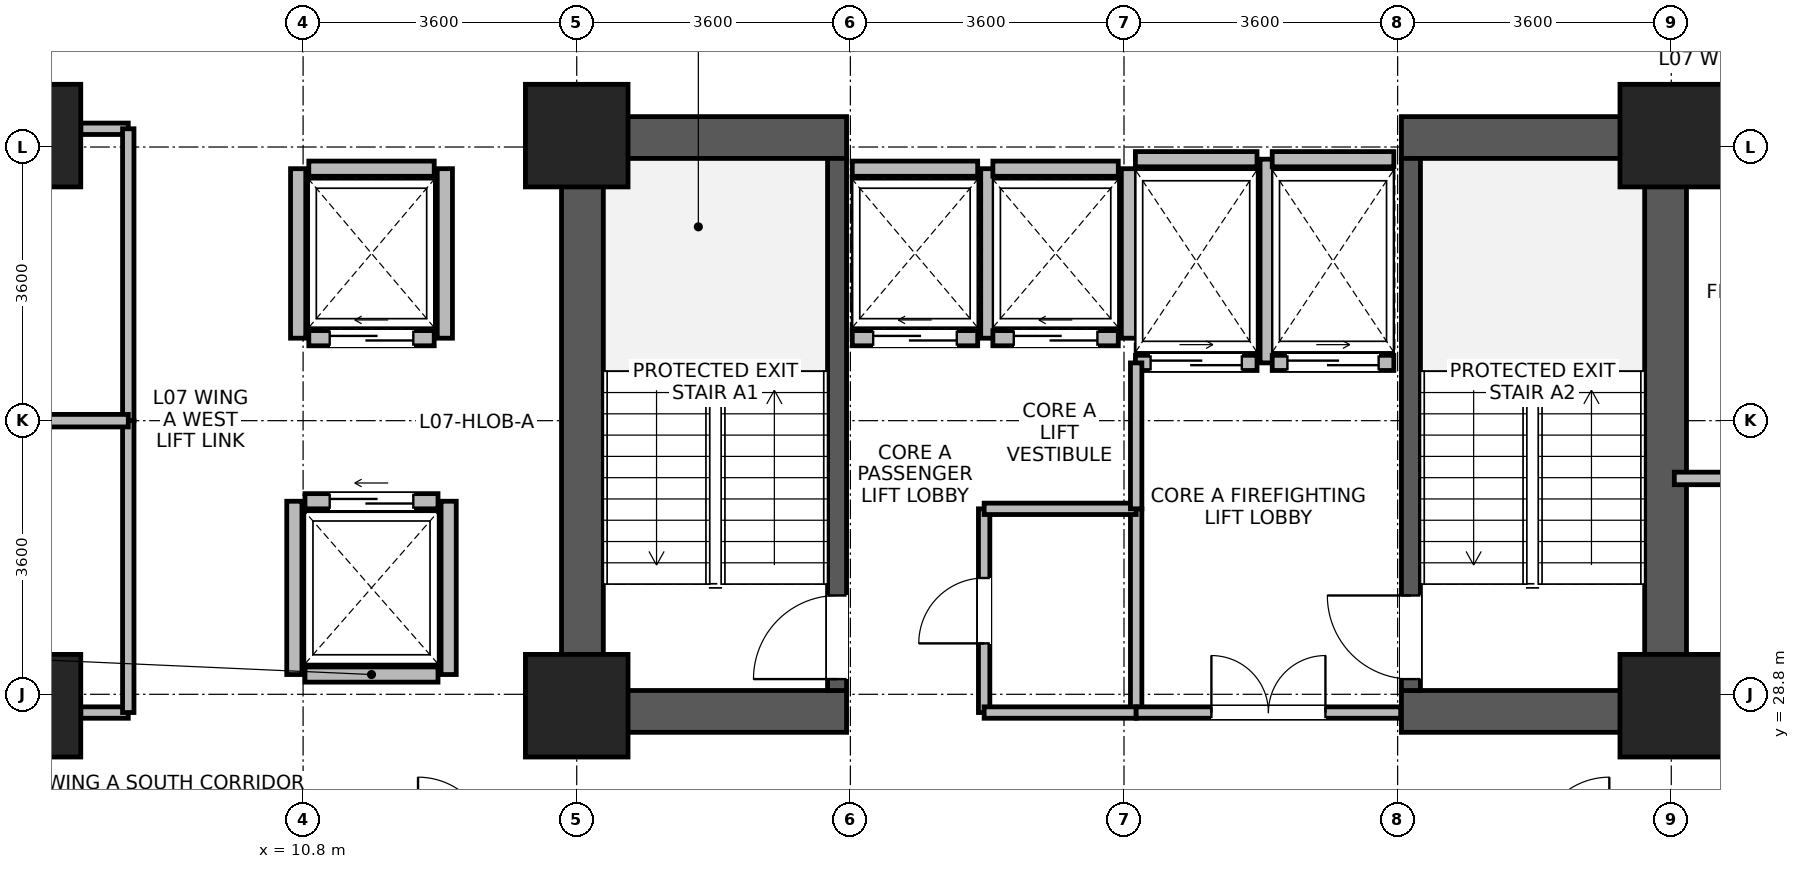
"""IFC4 building model, lengths in metres.
Left out: names, types, materials, properties, quantities, classifications, styles, units other than length and angle.
Written with IfcOpenShell. Run it as: python <this file> out.ifc"""

import sys

from ifc_helpers import new_model, si_unit, direction, frame, frame_2d, origin, origin_2d, place, context, subcontext, project, spatial, rectangle, extrude, source, transform, mapped, element, fill, save


model = new_model("IFC4")
c1 = context("Model", 3, precision=1e-05, world=origin(), true_north=direction((0.0, 1.0)))
c2 = subcontext(c1, "Body", "Model", "MODEL_VIEW")
j1 = project(units=[si_unit("LENGTHUNIT", "METRE"), si_unit("PLANEANGLEUNIT", "RADIAN")], contexts=[c1])
p1 = place(None, origin())
s1 = spatial("IfcSite", under=j1, at=p1, CompositionType="ELEMENT")
p2 = place(p1, origin())
s2 = spatial("IfcBuilding", under=s1, at=p2, CompositionType="ELEMENT")
p3 = place(p2, frame((0.0, 0.0, 32.7)))
s3 = spatial("IfcBuildingStorey", under=s2, at=p3, CompositionType="ELEMENT", Elevation=32.7)
for number, where, z_axis, x_axis in (
    (1, (14.475, 28.3, 0.0), (0.0, 0.0, 1.0), (0.0, 1.0, 0.0)),
    (2, (28.725, 28.3, 0.0), (0.0, 0.0, 1.0), (0.0, 1.0, 0.0)),
):
    element("IfcWall", number, at=place(p3, frame(where, z_axis=z_axis, x_axis=x_axis)), inside=s3, PredefinedType="SHEAR", context=c2, shape_type="SweptSolid", body=[
        extrude(rectangle(XDim=8.1, YDim=0.55, at=frame_2d((4.05, 0.0))), origin(), (0.0, 0.0, 1.0), 3.45),
    ])
for number, where, z_axis, x_axis in (
    (3, (14.75, 28.575, 0.0), (0.0, 0.0, 1.0), (1.0, 0.0, 0.0)),
    (4, (25.25, 28.575, 0.0), (0.0, 0.0, 1.0), (1.0, 0.0, 0.0)),
    (5, (14.75, 36.125, 0.0), (0.0, 0.0, 1.0), (1.0, 0.0, 0.0)),
    (6, (25.25, 36.125, 0.0), (0.0, 0.0, 1.0), (1.0, 0.0, 0.0)),
):
    element("IfcWall", number, at=place(p3, frame(where, z_axis=z_axis, x_axis=x_axis)), inside=s3, PredefinedType="SHEAR", context=c2, shape_type="SweptSolid", body=[
        extrude(rectangle(XDim=3.2, YDim=0.55, at=frame_2d((1.6, 0.0))), origin(), (0.0, 0.0, 1.0), 3.45),
    ])
p4 = place(p3, frame((17.825, 28.85, 0.0), z_axis=(0.0, 0.0, 1.0), x_axis=(0.0, 1.0, 0.0)))
e7 = element("IfcWall", 7, at=p4, inside=s3, PredefinedType="SHEAR", context=c2, shape_type="SweptSolid", body=[
    extrude(rectangle(XDim=7.0, YDim=0.25, at=frame_2d((3.5, 0.0))), origin(), (0.0, 0.0, 1.0), 3.45),
])
p5 = place(p4, frame((0.15, 0.0, 0.0)))
e8 = element("IfcOpeningElement", 8, at=p5, cuts=e7, PredefinedType="OPENING", context=c2, shape_type="SweptSolid", body=[
    extrude(rectangle(XDim=1.1, YDim=2.08, at=frame_2d((0.55, 1.04))), frame((0.0, 0.135, 0.0), z_axis=(0.0, -1.0, 0.0), x_axis=(1.0, 0.0, 0.0)), (0.0, 0.0, 1.0), 0.27),
])
p6 = place(p3, frame((25.375, 28.85, 0.0), z_axis=(0.0, 0.0, 1.0), x_axis=(0.0, 1.0, 0.0)))
e9 = element("IfcWall", 9, at=p6, inside=s3, PredefinedType="SHEAR", context=c2, shape_type="SweptSolid", body=[
    extrude(rectangle(XDim=7.0, YDim=0.25, at=frame_2d((3.5, 0.0))), origin(), (0.0, 0.0, 1.0), 3.45),
])
p7 = place(p6, frame((0.15, 0.0, 0.0)))
e10 = element("IfcOpeningElement", 10, at=p7, cuts=e9, PredefinedType="OPENING", context=c2, shape_type="SweptSolid", body=[
    extrude(rectangle(XDim=1.1, YDim=2.08, at=frame_2d((0.55, 1.04))), frame((0.0, 0.135, 0.0), z_axis=(0.0, -1.0, 0.0), x_axis=(1.0, 0.0, 0.0)), (0.0, 0.0, 1.0), 0.27),
])
m1 = source(origin(), c2, "Body", "SweptSolid", [
    extrude(rectangle(XDim=1.35, YDim=1.35, at=origin_2d()), origin(), (0.0, 0.0, 1.0), 3.7),
])
for number, where, z_axis, x_axis in (
    (11, (7.2, 28.65, 0.0), (0.0, 0.0, 1.0), (1.0, 0.0, 0.0)),
    (12, (7.2, 36.15, 0.0), (0.0, 0.0, 1.0), (1.0, 0.0, 0.0)),
    (13, (14.4, 28.65, 0.0), (0.0, 0.0, 1.0), (1.0, 0.0, 0.0)),
    (14, (14.4, 36.15, 0.0), (0.0, 0.0, 1.0), (1.0, 0.0, 0.0)),
    (15, (28.8, 28.65, 0.0), (0.0, 0.0, 1.0), (1.0, 0.0, 0.0)),
    (16, (28.8, 36.15, 0.0), (0.0, 0.0, 1.0), (1.0, 0.0, 0.0)),
):
    element("IfcColumn", number, at=place(p3, frame(where, z_axis=z_axis, x_axis=x_axis)), inside=s3, PredefinedType="COLUMN", context=c2, shape_type="MappedRepresentation", body=[
        mapped(m1, transform((0.0, 0.0, 0.0), x_axis=(1.0, 0.0, 0.0), y_axis=(0.0, 1.0, 0.0), z_axis=(0.0, 0.0, 1.0), scale=1.0)),
    ])
p8 = place(p3, frame((18.025, 33.485, 0.0), z_axis=(0.0, 0.0, 1.0), x_axis=(1.0, 0.0, 0.0)))
e17 = element("IfcWall", 17, at=p8, inside=s3, PredefinedType="PARTITIONING", context=c2, shape_type="SweptSolid", body=[
    extrude(rectangle(XDim=1.65, YDim=0.2, at=frame_2d((0.825, 0.0))), origin(), (0.0, 0.0, 1.0), 3.43),
])
p9 = place(p8, frame((0.275, 0.0, 0.0)))
e18 = element("IfcOpeningElement", 18, at=p9, cuts=e17, PredefinedType="OPENING", context=c2, shape_type="SweptSolid", body=[
    extrude(rectangle(XDim=1.1, YDim=2.12, at=frame_2d((0.55, 1.06))), frame((0.0, 0.11, 0.0), z_axis=(0.0, -1.0, 0.0), x_axis=(1.0, 0.0, 0.0)), (0.0, 0.0, 1.0), 0.22),
])
p10 = place(p3, frame((18.025, 35.715, 0.0), z_axis=(0.0, 0.0, 1.0), x_axis=(1.0, 0.0, 0.0)))
e19 = element("IfcWall", 19, at=p10, inside=s3, PredefinedType="PARTITIONING", context=c2, shape_type="SweptSolid", body=[
    extrude(rectangle(XDim=1.65, YDim=0.2, at=frame_2d((0.825, 0.0))), origin(), (0.0, 0.0, 1.0), 2.23),
])
p11 = place(p3, frame((19.815, 33.485, 0.0), z_axis=(0.0, 0.0, 1.0), x_axis=(0.0, 1.0, 0.0)))
e20 = element("IfcWall", 20, at=p11, inside=s3, PredefinedType="PARTITIONING", context=c2, shape_type="SweptSolid", body=[
    extrude(rectangle(XDim=2.23, YDim=0.2, at=frame_2d((1.115, 0.0))), origin(), (0.0, 0.0, 1.0), 3.43),
])
p12 = place(p3, frame((19.875, 33.485, 0.0), z_axis=(0.0, 0.0, 1.0), x_axis=(1.0, 0.0, 0.0)))
e21 = element("IfcWall", 21, at=p12, inside=s3, PredefinedType="PARTITIONING", context=c2, shape_type="SweptSolid", body=[
    extrude(rectangle(XDim=1.65, YDim=0.2, at=frame_2d((0.825, 0.0))), origin(), (0.0, 0.0, 1.0), 3.43),
])
p13 = place(p12, frame((0.275, 0.0, 0.0)))
e22 = element("IfcOpeningElement", 22, at=p13, cuts=e21, PredefinedType="OPENING", context=c2, shape_type="SweptSolid", body=[
    extrude(rectangle(XDim=1.1, YDim=2.12, at=frame_2d((0.55, 1.06))), frame((0.0, 0.11, 0.0), z_axis=(0.0, -1.0, 0.0), x_axis=(1.0, 0.0, 0.0)), (0.0, 0.0, 1.0), 0.22),
])
p14 = place(p3, frame((19.875, 35.715, 0.0), z_axis=(0.0, 0.0, 1.0), x_axis=(1.0, 0.0, 0.0)))
e23 = element("IfcWall", 23, at=p14, inside=s3, PredefinedType="PARTITIONING", context=c2, shape_type="SweptSolid", body=[
    extrude(rectangle(XDim=1.65, YDim=0.2, at=frame_2d((0.825, 0.0))), origin(), (0.0, 0.0, 1.0), 2.23),
])
p15 = place(p3, frame((21.665, 33.485, 0.0), z_axis=(0.0, 0.0, 1.0), x_axis=(0.0, 1.0, 0.0)))
e24 = element("IfcWall", 24, at=p15, inside=s3, PredefinedType="PARTITIONING", context=c2, shape_type="SweptSolid", body=[
    extrude(rectangle(XDim=2.23, YDim=0.2, at=frame_2d((1.115, 0.0))), origin(), (0.0, 0.0, 1.0), 3.43),
])
p16 = place(p3, frame((10.825, 29.06, 0.0), z_axis=(0.0, 0.0, 1.0), x_axis=(1.0, 0.0, 0.0)))
e25 = element("IfcWall", 25, at=p16, inside=s3, PredefinedType="PARTITIONING", context=c2, shape_type="SweptSolid", body=[
    extrude(rectangle(XDim=1.75, YDim=0.2, at=frame_2d((0.875, 0.0))), origin(), (0.0, 0.0, 1.0), 3.43),
])
p17 = place(p3, frame((10.825, 31.34, 0.0), z_axis=(0.0, 0.0, 1.0), x_axis=(1.0, 0.0, 0.0)))
e26 = element("IfcWall", 26, at=p17, inside=s3, PredefinedType="PARTITIONING", context=c2, shape_type="SweptSolid", body=[
    extrude(rectangle(XDim=1.75, YDim=0.2, at=frame_2d((0.875, 0.0))), origin(), (0.0, 0.0, 1.0), 3.43),
])
p18 = place(p17, frame((0.325, 0.0, 0.0)))
e27 = element("IfcOpeningElement", 27, at=p18, cuts=e26, PredefinedType="OPENING", context=c2, shape_type="SweptSolid", body=[
    extrude(rectangle(XDim=1.1, YDim=2.12, at=frame_2d((0.55, 1.06))), frame((0.0, 0.11, 0.0), z_axis=(0.0, -1.0, 0.0), x_axis=(1.0, 0.0, 0.0)), (0.0, 0.0, 1.0), 0.22),
])
for number, where, z_axis, x_axis in (
    (28, (10.685, 29.06, 0.0), (0.0, 0.0, 1.0), (0.0, 1.0, 0.0)),
    (29, (12.715, 29.06, 0.0), (0.0, 0.0, 1.0), (0.0, 1.0, 0.0)),
):
    element("IfcWall", number, at=place(p3, frame(where, z_axis=z_axis, x_axis=x_axis)), inside=s3, PredefinedType="PARTITIONING", context=c2, shape_type="SweptSolid", body=[
        extrude(rectangle(XDim=2.28, YDim=0.2, at=frame_2d((1.14, 0.0))), origin(), (0.0, 0.0, 1.0), 3.43),
    ])
p19 = place(p3, frame((10.875, 33.485, 0.0), z_axis=(0.0, 0.0, 1.0), x_axis=(1.0, 0.0, 0.0)))
e30 = element("IfcWall", 30, at=p19, inside=s3, PredefinedType="PARTITIONING", context=c2, shape_type="SweptSolid", body=[
    extrude(rectangle(XDim=1.65, YDim=0.2, at=frame_2d((0.825, 0.0))), origin(), (0.0, 0.0, 1.0), 3.43),
])
p20 = place(p19, frame((0.275, 0.0, 0.0)))
e31 = element("IfcOpeningElement", 31, at=p20, cuts=e30, PredefinedType="OPENING", context=c2, shape_type="SweptSolid", body=[
    extrude(rectangle(XDim=1.1, YDim=2.12, at=frame_2d((0.55, 1.06))), frame((0.0, 0.11, 0.0), z_axis=(0.0, -1.0, 0.0), x_axis=(1.0, 0.0, 0.0)), (0.0, 0.0, 1.0), 0.22),
])
p21 = place(p3, frame((10.875, 35.715, 0.0), z_axis=(0.0, 0.0, 1.0), x_axis=(1.0, 0.0, 0.0)))
e32 = element("IfcWall", 32, at=p21, inside=s3, PredefinedType="PARTITIONING", context=c2, shape_type="SweptSolid", body=[
    extrude(rectangle(XDim=1.65, YDim=0.2, at=frame_2d((0.825, 0.0))), origin(), (0.0, 0.0, 1.0), 3.43),
])
for number, where, z_axis, x_axis in (
    (33, (10.735, 33.485, 0.0), (0.0, 0.0, 1.0), (0.0, 1.0, 0.0)),
    (34, (12.665, 33.485, 0.0), (0.0, 0.0, 1.0), (0.0, 1.0, 0.0)),
):
    element("IfcWall", number, at=place(p3, frame(where, z_axis=z_axis, x_axis=x_axis)), inside=s3, PredefinedType="PARTITIONING", context=c2, shape_type="SweptSolid", body=[
        extrude(rectangle(XDim=2.23, YDim=0.2, at=frame_2d((1.115, 0.0))), origin(), (0.0, 0.0, 1.0), 3.43),
    ])
p22 = place(p3, frame((21.75, 33.16, 0.0), z_axis=(0.0, 0.0, 1.0), x_axis=(1.0, 0.0, 0.0)))
e35 = element("IfcWall", 35, at=p22, inside=s3, PredefinedType="PARTITIONING", context=c2, shape_type="SweptSolid", body=[
    extrude(rectangle(XDim=1.6, YDim=0.2, at=frame_2d((0.8, 0.0))), origin(), (0.0, 0.0, 1.0), 3.43),
])
p23 = place(p22, frame((0.2, 0.0, 0.0)))
e36 = element("IfcOpeningElement", 36, at=p23, cuts=e35, PredefinedType="OPENING", context=c2, shape_type="SweptSolid", body=[
    extrude(rectangle(XDim=1.2, YDim=2.12, at=frame_2d((0.6, 1.06))), frame((0.0, 0.11, 0.0), z_axis=(0.0, -1.0, 0.0), x_axis=(1.0, 0.0, 0.0)), (0.0, 0.0, 1.0), 0.22),
])
p24 = place(p3, frame((21.75, 35.84, 0.0), z_axis=(0.0, 0.0, 1.0), x_axis=(1.0, 0.0, 0.0)))
e37 = element("IfcWall", 37, at=p24, inside=s3, PredefinedType="PARTITIONING", context=c2, shape_type="SweptSolid", body=[
    extrude(rectangle(XDim=1.6, YDim=0.2, at=frame_2d((0.8, 0.0))), origin(), (0.0, 0.0, 1.0), 2.23),
])
p25 = place(p3, frame((23.49, 33.16, 0.0), z_axis=(0.0, 0.0, 1.0), x_axis=(0.0, 1.0, 0.0)))
e38 = element("IfcWall", 38, at=p25, inside=s3, PredefinedType="PARTITIONING", context=c2, shape_type="SweptSolid", body=[
    extrude(rectangle(XDim=2.68, YDim=0.2, at=frame_2d((1.34, 0.0))), origin(), (0.0, 0.0, 1.0), 3.43),
])
p26 = place(p3, frame((23.55, 33.16, 0.0), z_axis=(0.0, 0.0, 1.0), x_axis=(1.0, 0.0, 0.0)))
e39 = element("IfcWall", 39, at=p26, inside=s3, PredefinedType="PARTITIONING", context=c2, shape_type="SweptSolid", body=[
    extrude(rectangle(XDim=1.6, YDim=0.2, at=frame_2d((0.8, 0.0))), origin(), (0.0, 0.0, 1.0), 3.43),
])
p27 = place(p26, frame((0.2, 0.0, 0.0)))
e40 = element("IfcOpeningElement", 40, at=p27, cuts=e39, PredefinedType="OPENING", context=c2, shape_type="SweptSolid", body=[
    extrude(rectangle(XDim=1.2, YDim=2.12, at=frame_2d((0.6, 1.06))), frame((0.0, 0.11, 0.0), z_axis=(0.0, -1.0, 0.0), x_axis=(1.0, 0.0, 0.0)), (0.0, 0.0, 1.0), 0.22),
])
p28 = place(p3, frame((23.55, 35.84, 0.0), z_axis=(0.0, 0.0, 1.0), x_axis=(1.0, 0.0, 0.0)))
e41 = element("IfcWall", 41, at=p28, inside=s3, PredefinedType="PARTITIONING", context=c2, shape_type="SweptSolid", body=[
    extrude(rectangle(XDim=1.6, YDim=0.2, at=frame_2d((0.8, 0.0))), origin(), (0.0, 0.0, 1.0), 2.23),
])
for number, where, z_axis, x_axis in (
    (42, (7.875, 28.56, 0.0), (0.0, 0.0, 1.0), (1.0, 0.0, 0.0)),
    (43, (7.875, 36.24, 0.0), (0.0, 0.0, 1.0), (1.0, 0.0, 0.0)),
):
    element("IfcWall", number, at=place(p3, frame(where, z_axis=z_axis, x_axis=x_axis)), inside=s3, PredefinedType="PARTITIONING", context=c2, shape_type="SweptSolid", body=[
        extrude(rectangle(XDim=0.625, YDim=0.15, at=frame_2d((0.312, 0.0))), origin(), (0.0, 0.0, 1.0), 2.78),
    ])
p29 = place(p3, frame((8.5, 32.4, 0.0), z_axis=(0.0, 0.0, 1.0), x_axis=(0.0, 1.0, 0.0)))
e44 = element("IfcWall", 44, at=p29, inside=s3, PredefinedType="PARTITIONING", context=c2, shape_type="SweptSolid", body=[
    extrude(rectangle(XDim=3.84, YDim=0.15, at=frame_2d((1.92, 0.0))), origin(), (0.0, 0.0, 1.0), 3.43),
])
p30 = place(p3, frame((8.5, 28.56, 0.0), z_axis=(0.0, 0.0, 1.0), x_axis=(0.0, 1.0, 0.0)))
e45 = element("IfcWall", 45, at=p30, inside=s3, PredefinedType="PARTITIONING", context=c2, shape_type="SweptSolid", body=[
    extrude(rectangle(XDim=3.84, YDim=0.15, at=frame_2d((1.92, 0.0))), origin(), (0.0, 0.0, 1.0), 3.43),
])
p31 = place(p3, frame((19.76, 28.56, 0.0), z_axis=(0.0, 0.0, 1.0), x_axis=(0.0, 1.0, 0.0)))
e46 = element("IfcWall", 46, at=p31, inside=s3, PredefinedType="PARTITIONING", context=c2, shape_type="SweptSolid", body=[
    extrude(rectangle(XDim=2.68, YDim=0.15, at=frame_2d((1.34, 0.0))), origin(), (0.0, 0.0, 1.0), 3.43),
])
p32 = place(p31, frame((0.91, 0.0, 0.0)))
e47 = element("IfcOpeningElement", 47, at=p32, cuts=e46, PredefinedType="OPENING", context=c2, shape_type="SweptSolid", body=[
    extrude(rectangle(XDim=0.86, YDim=2.02, at=frame_2d((0.43, 1.01))), frame((0.0, 0.085, 0.0), z_axis=(0.0, -1.0, 0.0), x_axis=(1.0, 0.0, 0.0)), (0.0, 0.0, 1.0), 0.17),
])
p33 = place(p3, frame((21.76, 28.56, 0.0), z_axis=(0.0, 0.0, 1.0), x_axis=(0.0, 1.0, 0.0)))
e48 = element("IfcWall", 48, at=p33, inside=s3, PredefinedType="PARTITIONING", context=c2, shape_type="SweptSolid", body=[
    extrude(rectangle(XDim=2.68, YDim=0.15, at=frame_2d((1.34, 0.0))), origin(), (0.0, 0.0, 1.0), 3.43),
])
p34 = place(p3, frame((19.76, 28.56, 0.0), z_axis=(0.0, 0.0, 1.0), x_axis=(1.0, 0.0, 0.0)))
e49 = element("IfcWall", 49, at=p34, inside=s3, PredefinedType="PARTITIONING", context=c2, shape_type="SweptSolid", body=[
    extrude(rectangle(XDim=2.0, YDim=0.15, at=frame_2d((1.0, 0.0))), origin(), (0.0, 0.0, 1.0), 2.23),
])
p35 = place(p3, frame((19.76, 31.24, 0.0), z_axis=(0.0, 0.0, 1.0), x_axis=(1.0, 0.0, 0.0)))
e50 = element("IfcWall", 50, at=p35, inside=s3, PredefinedType="PARTITIONING", context=c2, shape_type="SweptSolid", body=[
    extrude(rectangle(XDim=2.0, YDim=0.15, at=frame_2d((1.0, 0.0))), origin(), (0.0, 0.0, 1.0), 3.43),
])
p36 = place(p3, frame((3.62, 32.4, 0.0), z_axis=(0.0, 0.0, 1.0), x_axis=(1.0, 0.0, 0.0)))
e51 = element("IfcWall", 51, at=p36, inside=s3, PredefinedType="PARTITIONING", context=c2, shape_type="SweptSolid", body=[
    extrude(rectangle(XDim=4.88, YDim=0.165, at=frame_2d((2.44, 0.0))), origin(), (0.0, 0.0, 1.0), 3.43),
])
p37 = place(p3, frame((28.84, 31.64, 0.0), z_axis=(0.0, 0.0, 1.0), x_axis=(1.0, 0.0, 0.0)))
e52 = element("IfcWall", 52, at=p37, inside=s3, PredefinedType="PARTITIONING", context=c2, shape_type="SweptSolid", body=[
    extrude(rectangle(XDim=4.52, YDim=0.165, at=frame_2d((2.26, 0.0))), origin(), (0.0, 0.0, 1.0), 3.43),
])
p38 = place(p3, frame((21.76, 28.56, 0.0), z_axis=(0.0, 0.0, 1.0), x_axis=(1.0, 0.0, 0.0)))
e53 = element("IfcWall", 53, at=p38, inside=s3, PredefinedType="PARTITIONING", context=c2, shape_type="SweptSolid", body=[
    extrude(rectangle(XDim=3.48, YDim=0.15, at=frame_2d((1.74, 0.0))), origin(), (0.0, 0.0, 1.0), 2.23),
])
p39 = place(p38, frame((0.99, 0.0, 0.0)))
e54 = element("IfcOpeningElement", 54, at=p39, cuts=e53, PredefinedType="OPENING", context=c2, shape_type="SweptSolid", body=[
    extrude(rectangle(XDim=1.5, YDim=2.1, at=frame_2d((0.75, 1.05))), frame((0.0, 0.085, 0.0), z_axis=(0.0, -1.0, 0.0), x_axis=(1.0, 0.0, 0.0)), (0.0, 0.0, 1.0), 0.17),
])
p40 = place(p3, frame((21.76, 31.24, 0.0), z_axis=(0.0, 0.0, 1.0), x_axis=(0.0, 1.0, 0.0)))
e55 = element("IfcWall", 55, at=p40, inside=s3, PredefinedType="PARTITIONING", context=c2, shape_type="SweptSolid", body=[
    extrude(rectangle(XDim=1.92, YDim=0.15, at=frame_2d((0.96, 0.0))), origin(), (0.0, 0.0, 1.0), 3.43),
])
p41 = place(p5, origin())
e56 = element("IfcDoor", 56, at=p41, inside=s3, OperationType="SINGLE_SWING_LEFT", PredefinedType="DOOR", context=c2, shape_type="SweptSolid", body=[
    extrude(rectangle(XDim=1.1, YDim=2.08, at=frame_2d((0.55, 1.04))), frame((0.0, 0.025, 0.0), z_axis=(0.0, -1.0, 0.0), x_axis=(1.0, 0.0, 0.0)), (0.0, 0.0, 1.0), 0.05),
])
fill(e8, e56)
p42 = place(p7, origin())
e57 = element("IfcDoor", 57, at=p42, inside=s3, OperationType="SINGLE_SWING_RIGHT", PredefinedType="DOOR", context=c2, shape_type="SweptSolid", body=[
    extrude(rectangle(XDim=1.1, YDim=2.08, at=frame_2d((0.55, 1.04))), frame((0.0, 0.025, 0.0), z_axis=(0.0, -1.0, 0.0), x_axis=(1.0, 0.0, 0.0)), (0.0, 0.0, 1.0), 0.05),
])
fill(e10, e57)
p43 = place(p9, origin())
e58 = element("IfcDoor", 58, at=p43, inside=s3, OperationType="SLIDING_TO_LEFT", PredefinedType="DOOR", context=c2, shape_type="SweptSolid", body=[
    extrude(rectangle(XDim=1.1, YDim=2.12, at=frame_2d((0.55, 1.06))), frame((0.0, 0.025, 0.0), z_axis=(0.0, -1.0, 0.0), x_axis=(1.0, 0.0, 0.0)), (0.0, 0.0, 1.0), 0.05),
])
fill(e18, e58)
p44 = place(p13, origin())
e59 = element("IfcDoor", 59, at=p44, inside=s3, OperationType="SLIDING_TO_LEFT", PredefinedType="DOOR", context=c2, shape_type="SweptSolid", body=[
    extrude(rectangle(XDim=1.1, YDim=2.12, at=frame_2d((0.55, 1.06))), frame((0.0, 0.025, 0.0), z_axis=(0.0, -1.0, 0.0), x_axis=(1.0, 0.0, 0.0)), (0.0, 0.0, 1.0), 0.05),
])
fill(e22, e59)
p45 = place(p18, origin())
e60 = element("IfcDoor", 60, at=p45, inside=s3, OperationType="SLIDING_TO_LEFT", PredefinedType="DOOR", context=c2, shape_type="SweptSolid", body=[
    extrude(rectangle(XDim=1.1, YDim=2.12, at=frame_2d((0.55, 1.06))), frame((0.0, 0.025, 0.0), z_axis=(0.0, -1.0, 0.0), x_axis=(1.0, 0.0, 0.0)), (0.0, 0.0, 1.0), 0.05),
])
fill(e27, e60)
p46 = place(p20, origin())
e61 = element("IfcDoor", 61, at=p46, inside=s3, OperationType="SLIDING_TO_LEFT", PredefinedType="DOOR", context=c2, shape_type="SweptSolid", body=[
    extrude(rectangle(XDim=1.1, YDim=2.12, at=frame_2d((0.55, 1.06))), frame((0.0, 0.025, 0.0), z_axis=(0.0, -1.0, 0.0), x_axis=(1.0, 0.0, 0.0)), (0.0, 0.0, 1.0), 0.05),
])
fill(e31, e61)
p47 = place(p23, origin())
e62 = element("IfcDoor", 62, at=p47, inside=s3, OperationType="SLIDING_TO_RIGHT", PredefinedType="DOOR", context=c2, shape_type="SweptSolid", body=[
    extrude(rectangle(XDim=1.2, YDim=2.12, at=frame_2d((0.6, 1.06))), frame((0.0, 0.025, 0.0), z_axis=(0.0, -1.0, 0.0), x_axis=(1.0, 0.0, 0.0)), (0.0, 0.0, 1.0), 0.05),
])
fill(e36, e62)
p48 = place(p27, origin())
e63 = element("IfcDoor", 63, at=p48, inside=s3, OperationType="SLIDING_TO_RIGHT", PredefinedType="DOOR", context=c2, shape_type="SweptSolid", body=[
    extrude(rectangle(XDim=1.2, YDim=2.12, at=frame_2d((0.6, 1.06))), frame((0.0, 0.025, 0.0), z_axis=(0.0, -1.0, 0.0), x_axis=(1.0, 0.0, 0.0)), (0.0, 0.0, 1.0), 0.05),
])
fill(e40, e63)
p49 = place(p32, origin())
e64 = element("IfcDoor", 64, at=p49, inside=s3, OperationType="SINGLE_SWING_LEFT", PredefinedType="DOOR", context=c2, shape_type="SweptSolid", body=[
    extrude(rectangle(XDim=0.86, YDim=2.02, at=frame_2d((0.43, 1.01))), frame((0.0, 0.025, 0.0), z_axis=(0.0, -1.0, 0.0), x_axis=(1.0, 0.0, 0.0)), (0.0, 0.0, 1.0), 0.05),
])
fill(e47, e64)
p50 = place(p39, origin())
e65 = element("IfcDoor", 65, at=p50, inside=s3, OperationType="DOUBLE_DOOR_SINGLE_SWING", PredefinedType="DOOR", context=c2, shape_type="SweptSolid", body=[
    extrude(rectangle(XDim=1.5, YDim=2.1, at=frame_2d((0.75, 1.05))), frame((0.0, 0.025, 0.0), z_axis=(0.0, -1.0, 0.0), x_axis=(1.0, 0.0, 0.0)), (0.0, 0.0, 1.0), 0.05),
])
fill(e54, e65)
save(model, sys.argv[1])
